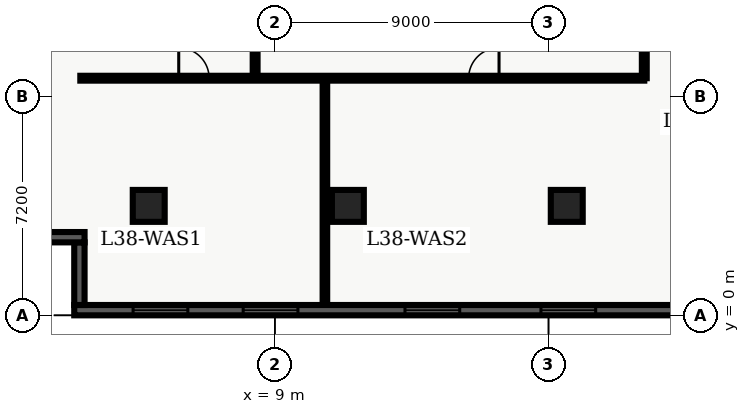
"""IFC4 building model, lengths in metres.
Left out: names, types, materials, properties, quantities, classifications, styles, units other than length and angle.
Written with IfcOpenShell. Run it as: python <this file> out.ifc"""

import sys

from ifc_helpers import new_model, entity, si_unit, converted_unit, direction, frame, origin_with_axes, origin_2d_with_axis, place, context, subcontext, project, spatial, polyline, rectangle, outline, extrude, element, fill, save


model = new_model("IFC4")
c1 = context("Model", 3, precision=1e-05, world=origin_with_axes(), true_north=direction((0.0, 1.0)))
c2 = subcontext(c1, "Body", "Model", "MODEL_VIEW")
j1 = project(units=[si_unit("LENGTHUNIT", "METRE"), converted_unit("PLANEANGLEUNIT", "DEGREE", entity("IfcPlaneAngleMeasure", 0.017), si_unit("PLANEANGLEUNIT", "RADIAN"), dimensions=[0, 0, 0, 0, 0, 0, 0])], contexts=[c1])
p1 = place(None, origin_with_axes())
s1 = spatial("IfcSite", under=j1, at=p1, CompositionType="ELEMENT")
p2 = place(p1, origin_with_axes())
s2 = spatial("IfcBuilding", under=s1, at=p2, CompositionType="ELEMENT")
p3 = place(p2, frame((0.0, 0.0, 156.3), z_axis=(0.0, 0.0, 1.0), x_axis=(1.0, 0.0, 0.0)))
s3 = spatial("IfcBuildingStorey", under=s2, at=p3, CompositionType="ELEMENT", Elevation=156.3)
for number, where, z_axis, x_axis in (
    (1, (11.4, 3.6, 0.0), (0.0, 0.0, 1.0), (1.0, 0.0, 0.0)),
    (2, (18.6, 3.6, 0.0), (0.0, 0.0, 1.0), (1.0, 0.0, 0.0)),
    (3, (4.85, 3.6, 0.0), (0.0, 0.0, 1.0), (1.0, 0.0, 0.0)),
):
    element("IfcColumn", number, at=place(p3, frame(where, z_axis=z_axis, x_axis=x_axis)), inside=s3, PredefinedType="COLUMN", context=c2, shape_type="SweptSolid", body=[
        extrude(rectangle(XDim=1.05, YDim=1.05, at=origin_2d_with_axis()), origin_with_axes(), (0.0, 0.0, 1.0), 3.9),
    ])
p4 = place(p3, frame((2.6, 7.8, 0.0), z_axis=(0.0, 0.0, 1.0), x_axis=(1.0, 0.0, 0.0)))
e4 = element("IfcWall", 4, at=p4, inside=s3, PredefinedType="PARTITIONING", context=c2, shape_type="SweptSolid", body=[
    extrude(outline(polyline([(0.0, -0.08), (18.55, -0.08), (18.55, 0.08), (0.0, 0.08), (0.0, -0.08)])), origin_with_axes(), (0.0, 0.0, 1.0), 2.7),
])
p5 = place(p4, frame((3.737, 0.0, 0.0), z_axis=(0.0, 0.0, 1.0), x_axis=(1.0, 0.0, 0.0)))
e5 = element("IfcOpeningElement", 5, at=p5, cuts=e4, PredefinedType="OPENING", context=c2, shape_type="SweptSolid", body=[
    extrude(rectangle(XDim=1.0, YDim=0.18, at=origin_2d_with_axis()), origin_with_axes(), (0.0, 0.0, 1.0), 2.15),
])
p6 = place(p4, frame((13.273, 0.0, 0.0), z_axis=(0.0, 0.0, 1.0), x_axis=(1.0, 0.0, 0.0)))
e6 = element("IfcOpeningElement", 6, at=p6, cuts=e4, PredefinedType="OPENING", context=c2, shape_type="SweptSolid", body=[
    extrude(rectangle(XDim=1.0, YDim=0.18, at=origin_2d_with_axis()), origin_with_axes(), (0.0, 0.0, 1.0), 2.15),
])
p7 = place(p3, frame((21.15, 7.8, 0.0), z_axis=(0.0, 0.0, 1.0), x_axis=(0.0, 1.0, 0.0)))
e7 = element("IfcWall", 7, at=p7, inside=s3, PredefinedType="PARTITIONING", context=c2, shape_type="SweptSolid", body=[
    extrude(outline(polyline([(0.0, -0.08), (32.7, -0.08), (32.7, 0.08), (0.0, 0.08), (0.0, -0.08)])), origin_with_axes(), (0.0, 0.0, 1.0), 2.7),
])
p8 = place(p7, frame((5.775, 0.0, 0.0), z_axis=(0.0, 0.0, 1.0), x_axis=(1.0, 0.0, 0.0)))
e8 = element("IfcOpeningElement", 8, at=p8, cuts=e7, PredefinedType="OPENING", context=c2, shape_type="SweptSolid", body=[
    extrude(rectangle(XDim=1.05, YDim=0.18, at=origin_2d_with_axis()), origin_with_axes(), (0.0, 0.0, 1.0), 2.15),
])
p9 = place(p3, frame((8.35, 7.8, 0.0), z_axis=(0.0, 0.0, 1.0), x_axis=(0.0, 1.0, 0.0)))
e9 = element("IfcWall", 9, at=p9, inside=s3, PredefinedType="PARTITIONING", context=c2, shape_type="SweptSolid", body=[
    extrude(outline(polyline([(0.0, -0.08), (12.6, -0.08), (12.6, 0.08), (0.0, 0.08), (0.0, -0.08)])), origin_with_axes(), (0.0, 0.0, 1.0), 2.7),
])
p10 = place(p9, frame((2.893, 0.0, 0.0), z_axis=(0.0, 0.0, 1.0), x_axis=(1.0, 0.0, 0.0)))
e10 = element("IfcOpeningElement", 10, at=p10, cuts=e9, PredefinedType="OPENING", context=c2, shape_type="SweptSolid", body=[
    extrude(rectangle(XDim=1.0, YDim=0.18, at=origin_2d_with_axis()), origin_with_axes(), (0.0, 0.0, 1.0), 2.15),
])
p11 = place(p9, frame((9.088, 0.0, 0.0), z_axis=(0.0, 0.0, 1.0), x_axis=(1.0, 0.0, 0.0)))
e11 = element("IfcOpeningElement", 11, at=p11, cuts=e9, PredefinedType="OPENING", context=c2, shape_type="SweptSolid", body=[
    extrude(rectangle(XDim=1.0, YDim=0.18, at=origin_2d_with_axis()), origin_with_axes(), (0.0, 0.0, 1.0), 2.15),
])
p12 = place(p3, frame((10.645, 0.335, 0.0), z_axis=(0.0, 0.0, 1.0), x_axis=(0.0, 1.0, 0.0)))
e12 = element("IfcWall", 12, at=p12, inside=s3, PredefinedType="PARTITIONING", context=c2, shape_type="SweptSolid", body=[
    extrude(outline(polyline([(0.0, -0.075), (7.365, -0.075), (7.365, 0.075), (0.0, 0.075), (0.0, -0.075)])), origin_with_axes(), (0.0, 0.0, 1.0), 2.7),
])
p13 = place(p3, frame((57.26, 0.17, 0.0), z_axis=(0.0, 0.0, 1.0), x_axis=(-1.0, 0.0, 0.0)))
e13 = element("IfcWall", 13, at=p13, inside=s3, PredefinedType="SOLIDWALL", context=c2, shape_type="SweptSolid", body=[
    extrude(outline(polyline([(0.0, -0.17), (54.86, -0.17), (54.86, 0.17), (0.0, 0.17), (0.0, -0.17)])), origin_with_axes(), (0.0, 0.0, 1.0), 3.66),
])
p14 = place(p13, frame((2.836, 0.0, 0.45), z_axis=(0.0, 0.0, 1.0), x_axis=(1.0, 0.0, 0.0)))
e14 = element("IfcOpeningElement", 14, at=p14, cuts=e13, PredefinedType="OPENING", context=c2, shape_type="SweptSolid", body=[
    extrude(rectangle(XDim=1.8, YDim=0.36, at=origin_2d_with_axis()), origin_with_axes(), (0.0, 0.0, 1.0), 2.1),
])
p15 = place(p13, frame((7.307, 0.0, 0.45), z_axis=(0.0, 0.0, 1.0), x_axis=(1.0, 0.0, 0.0)))
e15 = element("IfcOpeningElement", 15, at=p15, cuts=e13, PredefinedType="OPENING", context=c2, shape_type="SweptSolid", body=[
    extrude(rectangle(XDim=1.8, YDim=0.36, at=origin_2d_with_axis()), origin_with_axes(), (0.0, 0.0, 1.0), 2.1),
])
p16 = place(p13, frame((11.779, 0.0, 0.45), z_axis=(0.0, 0.0, 1.0), x_axis=(1.0, 0.0, 0.0)))
e16 = element("IfcOpeningElement", 16, at=p16, cuts=e13, PredefinedType="OPENING", context=c2, shape_type="SweptSolid", body=[
    extrude(rectangle(XDim=1.8, YDim=0.36, at=origin_2d_with_axis()), origin_with_axes(), (0.0, 0.0, 1.0), 2.1),
])
p17 = place(p13, frame((16.251, 0.0, 0.45), z_axis=(0.0, 0.0, 1.0), x_axis=(1.0, 0.0, 0.0)))
e17 = element("IfcOpeningElement", 17, at=p17, cuts=e13, PredefinedType="OPENING", context=c2, shape_type="SweptSolid", body=[
    extrude(rectangle(XDim=1.8, YDim=0.36, at=origin_2d_with_axis()), origin_with_axes(), (0.0, 0.0, 1.0), 2.1),
])
p18 = place(p13, frame((20.723, 0.0, 0.45), z_axis=(0.0, 0.0, 1.0), x_axis=(1.0, 0.0, 0.0)))
e18 = element("IfcOpeningElement", 18, at=p18, cuts=e13, PredefinedType="OPENING", context=c2, shape_type="SweptSolid", body=[
    extrude(rectangle(XDim=1.8, YDim=0.36, at=origin_2d_with_axis()), origin_with_axes(), (0.0, 0.0, 1.0), 2.1),
])
p19 = place(p13, frame((25.194, 0.0, 0.45), z_axis=(0.0, 0.0, 1.0), x_axis=(1.0, 0.0, 0.0)))
e19 = element("IfcOpeningElement", 19, at=p19, cuts=e13, PredefinedType="OPENING", context=c2, shape_type="SweptSolid", body=[
    extrude(rectangle(XDim=1.8, YDim=0.36, at=origin_2d_with_axis()), origin_with_axes(), (0.0, 0.0, 1.0), 2.1),
])
p20 = place(p13, frame((29.666, 0.0, 0.45), z_axis=(0.0, 0.0, 1.0), x_axis=(1.0, 0.0, 0.0)))
e20 = element("IfcOpeningElement", 20, at=p20, cuts=e13, PredefinedType="OPENING", context=c2, shape_type="SweptSolid", body=[
    extrude(rectangle(XDim=1.8, YDim=0.36, at=origin_2d_with_axis()), origin_with_axes(), (0.0, 0.0, 1.0), 2.1),
])
p21 = place(p13, frame((34.138, 0.0, 0.45), z_axis=(0.0, 0.0, 1.0), x_axis=(1.0, 0.0, 0.0)))
e21 = element("IfcOpeningElement", 21, at=p21, cuts=e13, PredefinedType="OPENING", context=c2, shape_type="SweptSolid", body=[
    extrude(rectangle(XDim=1.8, YDim=0.36, at=origin_2d_with_axis()), origin_with_axes(), (0.0, 0.0, 1.0), 2.1),
])
p22 = place(p13, frame((38.609, 0.0, 0.45), z_axis=(0.0, 0.0, 1.0), x_axis=(1.0, 0.0, 0.0)))
e22 = element("IfcOpeningElement", 22, at=p22, cuts=e13, PredefinedType="OPENING", context=c2, shape_type="SweptSolid", body=[
    extrude(rectangle(XDim=1.8, YDim=0.36, at=origin_2d_with_axis()), origin_with_axes(), (0.0, 0.0, 1.0), 2.1),
])
p23 = place(p13, frame((43.081, 0.0, 0.45), z_axis=(0.0, 0.0, 1.0), x_axis=(1.0, 0.0, 0.0)))
e23 = element("IfcOpeningElement", 23, at=p23, cuts=e13, PredefinedType="OPENING", context=c2, shape_type="SweptSolid", body=[
    extrude(rectangle(XDim=1.8, YDim=0.36, at=origin_2d_with_axis()), origin_with_axes(), (0.0, 0.0, 1.0), 2.1),
])
p24 = place(p13, frame((48.403, 0.0, 0.45), z_axis=(0.0, 0.0, 1.0), x_axis=(1.0, 0.0, 0.0)))
e24 = element("IfcOpeningElement", 24, at=p24, cuts=e13, PredefinedType="OPENING", context=c2, shape_type="SweptSolid", body=[
    extrude(rectangle(XDim=1.8, YDim=0.36, at=origin_2d_with_axis()), origin_with_axes(), (0.0, 0.0, 1.0), 2.1),
])
p25 = place(p13, frame((52.024, 0.0, 0.45), z_axis=(0.0, 0.0, 1.0), x_axis=(1.0, 0.0, 0.0)))
e25 = element("IfcOpeningElement", 25, at=p25, cuts=e13, PredefinedType="OPENING", context=c2, shape_type="SweptSolid", body=[
    extrude(rectangle(XDim=1.8, YDim=0.36, at=origin_2d_with_axis()), origin_with_axes(), (0.0, 0.0, 1.0), 2.1),
])
p26 = place(p3, frame((2.57, 0.34, 0.0), z_axis=(0.0, 0.0, 1.0), x_axis=(0.0, 1.0, 0.0)))
e26 = element("IfcWall", 26, at=p26, inside=s3, PredefinedType="SOLIDWALL", context=c2, shape_type="SweptSolid", body=[
    extrude(outline(polyline([(0.0, -0.17), (2.06, -0.17), (2.06, 0.17), (0.0, 0.17), (0.0, -0.17)])), origin_with_axes(), (0.0, 0.0, 1.0), 3.66),
])
p27 = place(p3, frame((2.74, 2.57, 0.0), z_axis=(0.0, 0.0, 1.0), x_axis=(-1.0, 0.0, 0.0)))
e27 = element("IfcWall", 27, at=p27, inside=s3, PredefinedType="SOLIDWALL", context=c2, shape_type="SweptSolid", body=[
    extrude(outline(polyline([(0.0, -0.17), (2.74, -0.17), (2.74, 0.17), (0.0, 0.17), (0.0, -0.17)])), origin_with_axes(), (0.0, 0.0, 1.0), 3.66),
])
p28 = place(p4, frame((3.737, 0.0, 0.0), z_axis=(0.0, 0.0, 1.0), x_axis=(1.0, 0.0, 0.0)))
e28 = element("IfcDoor", 28, at=p28, inside=s3, OperationType="SINGLE_SWING_LEFT", PredefinedType="DOOR", context=c2, shape_type="SweptSolid", body=[
    extrude(rectangle(XDim=1.0, YDim=0.09, at=origin_2d_with_axis()), origin_with_axes(), (0.0, 0.0, 1.0), 2.15),
])
fill(e5, e28)
p29 = place(p4, frame((13.273, 0.0, 0.0), z_axis=(0.0, 0.0, 1.0), x_axis=(1.0, 0.0, 0.0)))
e29 = element("IfcDoor", 29, at=p29, inside=s3, OperationType="SINGLE_SWING_RIGHT", PredefinedType="DOOR", context=c2, shape_type="SweptSolid", body=[
    extrude(rectangle(XDim=1.0, YDim=0.09, at=origin_2d_with_axis()), origin_with_axes(), (0.0, 0.0, 1.0), 2.15),
])
fill(e6, e29)
p30 = place(p13, frame((38.609, 0.0, 0.45), z_axis=(0.0, 0.0, 1.0), x_axis=(1.0, 0.0, 0.0)))
e30 = element("IfcWindow", 30, at=p30, inside=s3, PredefinedType="WINDOW", context=c2, shape_type="SweptSolid", body=[
    extrude(rectangle(XDim=1.8, YDim=0.09, at=origin_2d_with_axis()), origin_with_axes(), (0.0, 0.0, 1.0), 2.1),
])
fill(e22, e30)
p31 = place(p13, frame((43.081, 0.0, 0.45), z_axis=(0.0, 0.0, 1.0), x_axis=(1.0, 0.0, 0.0)))
e31 = element("IfcWindow", 31, at=p31, inside=s3, PredefinedType="WINDOW", context=c2, shape_type="SweptSolid", body=[
    extrude(rectangle(XDim=1.8, YDim=0.09, at=origin_2d_with_axis()), origin_with_axes(), (0.0, 0.0, 1.0), 2.1),
])
fill(e23, e31)
p32 = place(p13, frame((48.403, 0.0, 0.45), z_axis=(0.0, 0.0, 1.0), x_axis=(1.0, 0.0, 0.0)))
e32 = element("IfcWindow", 32, at=p32, inside=s3, PredefinedType="WINDOW", context=c2, shape_type="SweptSolid", body=[
    extrude(rectangle(XDim=1.8, YDim=0.09, at=origin_2d_with_axis()), origin_with_axes(), (0.0, 0.0, 1.0), 2.1),
])
fill(e24, e32)
p33 = place(p13, frame((52.024, 0.0, 0.45), z_axis=(0.0, 0.0, 1.0), x_axis=(1.0, 0.0, 0.0)))
e33 = element("IfcWindow", 33, at=p33, inside=s3, PredefinedType="WINDOW", context=c2, shape_type="SweptSolid", body=[
    extrude(rectangle(XDim=1.8, YDim=0.09, at=origin_2d_with_axis()), origin_with_axes(), (0.0, 0.0, 1.0), 2.1),
])
fill(e25, e33)
save(model, sys.argv[1])
